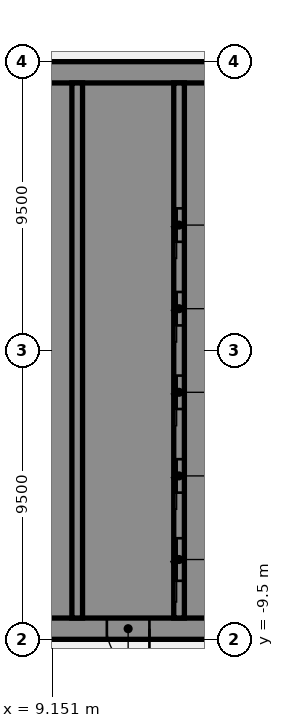
"""IFC4 building model, lengths in metres.
Left out: names, types, materials, properties, quantities, classifications, styles, units other than length and angle.
Written with IfcOpenShell. Run it as: python <this file> out.ifc"""

import sys

from ifc_helpers import new_model, si_unit, direction, frame, frame_2d, origin, place, context, subcontext, project, spatial, polyline, rectangle, outline, extrude, element, fill, save


model = new_model("IFC4")
c1 = context("Model", 3, precision=1e-05, world=origin(), true_north=direction((0.0, 1.0)))
c2 = subcontext(c1, "Body", "Model", "MODEL_VIEW")
j1 = project(units=[si_unit("LENGTHUNIT", "METRE"), si_unit("PLANEANGLEUNIT", "RADIAN")], contexts=[c1])
p1 = place(None, origin())
s1 = spatial("IfcSite", under=j1, at=p1, CompositionType="ELEMENT")
p2 = place(p1, origin())
s2 = spatial("IfcBuilding", under=s1, at=p2, CompositionType="ELEMENT")
p3 = place(p2, frame((0.0, 0.0, 9.0)))
s3 = spatial("IfcBuildingStorey", under=s2, at=p3, CompositionType="ELEMENT", Elevation=9.0)
p4 = place(p3, frame((16.5, -9.15, 0.0), z_axis=(0.0, 0.0, 1.0), x_axis=(-1.0, 0.0, 0.0)))
e1 = element("IfcWall", 1, at=p4, inside=s3, PredefinedType="SHEAR", context=c2, shape_type="SweptSolid", body=[
    extrude(rectangle(XDim=13.0, YDim=0.7, at=frame_2d((6.5, 0.0))), origin(), (0.0, 0.0, 1.0), 5.5),
])
p5 = place(p4, frame((4.15, 0.0, 0.0)))
e2 = element("IfcOpeningElement", 2, at=p5, cuts=e1, PredefinedType="OPENING", context=c2, shape_type="SweptSolid", body=[
    extrude(rectangle(XDim=1.4, YDim=2.1, at=frame_2d((0.7, 1.05))), frame((0.0, 0.36, 0.0), z_axis=(0.0, -1.0, 0.0), x_axis=(1.0, 0.0, 0.0)), (0.0, 0.0, 1.0), 0.72),
])
p6 = place(p4, frame((10.125, 0.0, 0.0)))
e3 = element("IfcOpeningElement", 3, at=p6, cuts=e1, PredefinedType="OPENING", context=c2, shape_type="SweptSolid", body=[
    extrude(rectangle(XDim=1.4, YDim=2.1, at=frame_2d((0.7, 1.05))), frame((0.0, 0.36, 0.0), z_axis=(0.0, -1.0, 0.0), x_axis=(1.0, 0.0, 0.0)), (0.0, 0.0, 1.0), 0.72),
])
p7 = place(p3, origin())
e4 = element("IfcWall", 4, at=p7, inside=s3, PredefinedType="SHEAR", context=c2, shape_type="SweptSolid", body=[
    extrude(outline(polyline([(13.5, -8.8), (15.8, -8.8), (16.5, -8.8), (16.5, 8.8), (15.8, 8.8), (13.5, 8.8), (13.5, 8.125), (15.8, 8.125), (15.8, 5.625), (13.5, 5.625), (13.5, 5.375), (15.8, 5.375), (15.8, 2.875), (13.5, 2.875), (13.5, 2.625), (15.8, 2.625), (15.8, 0.125), (13.5, 0.125), (13.5, -0.125), (15.8, -0.125), (15.8, -2.625), (13.5, -2.625), (13.5, -2.875), (15.8, -2.875), (15.8, -5.375), (13.5, -5.375), (13.5, -5.625), (15.8, -5.625), (15.8, -8.125), (13.5, -8.125), (13.5, -8.8)])), origin(), (0.0, 0.0, 1.0), 5.5),
])
p8 = place(p3, frame((16.5, 9.15, 0.0), z_axis=(0.0, 0.0, 1.0), x_axis=(-1.0, 0.0, 0.0)))
e5 = element("IfcWall", 5, at=p8, inside=s3, PredefinedType="SHEAR", context=c2, shape_type="SweptSolid", body=[
    extrude(rectangle(XDim=13.0, YDim=0.7, at=frame_2d((6.5, 0.0))), origin(), (0.0, 0.0, 1.0), 5.5),
])
p9 = place(p3, origin())
e6 = element("IfcWall", 6, at=p9, inside=s3, PredefinedType="SHEAR", context=c2, shape_type="SweptSolid", body=[
    extrude(outline(polyline([(9.8, -5.375), (7.5, -5.375), (7.5, -2.875), (9.8, -2.875), (9.8, -2.625), (7.5, -2.625), (7.5, -0.125), (9.8, -0.125), (9.8, 0.125), (7.5, 0.125), (7.5, 2.625), (9.8, 2.625), (9.8, 2.875), (7.5, 2.875), (7.5, 5.375), (9.8, 5.375), (9.8, 5.625), (7.5, 5.625), (7.5, 8.125), (9.8, 8.125), (9.8, 8.8), (7.5, 8.8), (7.15, 8.8), (7.15, -5.625), (7.5, -5.625), (9.8, -5.625), (9.8, -5.375)])), origin(), (0.0, 0.0, 1.0), 5.5),
])
p10 = place(p3, origin())
e7 = element("IfcWall", 7, at=p10, inside=s3, PredefinedType="SHEAR", context=c2, shape_type="SweptSolid", body=[
    extrude(outline(polyline([(7.5, -8.125), (7.5, -8.8), (9.8, -8.8), (9.8, -8.125), (9.8, -5.625), (9.55, -5.625), (9.55, -8.125), (7.5, -8.125)])), origin(), (0.0, 0.0, 1.0), 5.5),
])
p11 = place(p3, frame((13.325, -8.8, 0.0), z_axis=(0.0, 0.0, 1.0), x_axis=(0.0, 1.0, 0.0)))
e8 = element("IfcWall", 8, at=p11, inside=s3, PredefinedType="SHEAR", context=c2, shape_type="SweptSolid", body=[
    extrude(rectangle(XDim=17.6, YDim=0.35, at=frame_2d((8.8, 0.0))), origin(), (0.0, 0.0, 1.0), 5.5),
])
p12 = place(p11, frame((1.225, 0.0, 0.0)))
e9 = element("IfcOpeningElement", 9, at=p12, cuts=e8, PredefinedType="OPENING", context=c2, shape_type="SweptSolid", body=[
    extrude(rectangle(XDim=1.4, YDim=2.1, at=frame_2d((0.7, 1.05))), frame((0.0, 0.185, 0.0), z_axis=(0.0, -1.0, 0.0), x_axis=(1.0, 0.0, 0.0)), (0.0, 0.0, 1.0), 0.37),
])
p13 = place(p11, frame((4.125, 0.0, 0.0)))
e10 = element("IfcOpeningElement", 10, at=p13, cuts=e8, PredefinedType="OPENING", context=c2, shape_type="SweptSolid", body=[
    extrude(rectangle(XDim=1.1, YDim=2.1, at=frame_2d((0.55, 1.05))), frame((0.0, 0.185, 0.0), z_axis=(0.0, -1.0, 0.0), x_axis=(1.0, 0.0, 0.0)), (0.0, 0.0, 1.0), 0.37),
])
p14 = place(p11, frame((6.875, 0.0, 0.0)))
e11 = element("IfcOpeningElement", 11, at=p14, cuts=e8, PredefinedType="OPENING", context=c2, shape_type="SweptSolid", body=[
    extrude(rectangle(XDim=1.1, YDim=2.1, at=frame_2d((0.55, 1.05))), frame((0.0, 0.185, 0.0), z_axis=(0.0, -1.0, 0.0), x_axis=(1.0, 0.0, 0.0)), (0.0, 0.0, 1.0), 0.37),
])
p15 = place(p11, frame((9.625, 0.0, 0.0)))
e12 = element("IfcOpeningElement", 12, at=p15, cuts=e8, PredefinedType="OPENING", context=c2, shape_type="SweptSolid", body=[
    extrude(rectangle(XDim=1.1, YDim=2.1, at=frame_2d((0.55, 1.05))), frame((0.0, 0.185, 0.0), z_axis=(0.0, -1.0, 0.0), x_axis=(1.0, 0.0, 0.0)), (0.0, 0.0, 1.0), 0.37),
])
p16 = place(p11, frame((12.375, 0.0, 0.0)))
e13 = element("IfcOpeningElement", 13, at=p16, cuts=e8, PredefinedType="OPENING", context=c2, shape_type="SweptSolid", body=[
    extrude(rectangle(XDim=1.1, YDim=2.1, at=frame_2d((0.55, 1.05))), frame((0.0, 0.185, 0.0), z_axis=(0.0, -1.0, 0.0), x_axis=(1.0, 0.0, 0.0)), (0.0, 0.0, 1.0), 0.37),
])
p17 = place(p3, frame((9.975, -8.8, 0.0), z_axis=(0.0, 0.0, 1.0), x_axis=(0.0, 1.0, 0.0)))
e14 = element("IfcWall", 14, at=p17, inside=s3, PredefinedType="SHEAR", context=c2, shape_type="SweptSolid", body=[
    extrude(rectangle(XDim=17.6, YDim=0.35, at=frame_2d((8.8, 0.0))), origin(), (0.0, 0.0, 1.0), 5.5),
])
p18 = place(p5, origin())
e15 = element("IfcDoor", 15, at=p18, inside=s3, OperationType="SINGLE_SWING_LEFT", PredefinedType="DOOR", context=c2, shape_type="SweptSolid", body=[
    extrude(rectangle(XDim=1.4, YDim=2.1, at=frame_2d((0.7, 1.05))), frame((0.0, 0.025, 0.0), z_axis=(0.0, -1.0, 0.0), x_axis=(1.0, 0.0, 0.0)), (0.0, 0.0, 1.0), 0.05),
])
fill(e2, e15)
p19 = place(p12, origin())
e16 = element("IfcDoor", 16, at=p19, inside=s3, OperationType="SLIDING_TO_LEFT", PredefinedType="DOOR", context=c2, shape_type="SweptSolid", body=[
    extrude(rectangle(XDim=1.4, YDim=2.1, at=frame_2d((0.7, 1.05))), frame((0.0, 0.025, 0.0), z_axis=(0.0, -1.0, 0.0), x_axis=(1.0, 0.0, 0.0)), (0.0, 0.0, 1.0), 0.05),
])
fill(e9, e16)
p20 = place(p13, origin())
e17 = element("IfcDoor", 17, at=p20, inside=s3, OperationType="SLIDING_TO_LEFT", PredefinedType="DOOR", context=c2, shape_type="SweptSolid", body=[
    extrude(rectangle(XDim=1.1, YDim=2.1, at=frame_2d((0.55, 1.05))), frame((0.0, 0.025, 0.0), z_axis=(0.0, -1.0, 0.0), x_axis=(1.0, 0.0, 0.0)), (0.0, 0.0, 1.0), 0.05),
])
fill(e10, e17)
p21 = place(p14, origin())
e18 = element("IfcDoor", 18, at=p21, inside=s3, OperationType="SLIDING_TO_LEFT", PredefinedType="DOOR", context=c2, shape_type="SweptSolid", body=[
    extrude(rectangle(XDim=1.1, YDim=2.1, at=frame_2d((0.55, 1.05))), frame((0.0, 0.025, 0.0), z_axis=(0.0, -1.0, 0.0), x_axis=(1.0, 0.0, 0.0)), (0.0, 0.0, 1.0), 0.05),
])
fill(e11, e18)
p22 = place(p15, origin())
e19 = element("IfcDoor", 19, at=p22, inside=s3, OperationType="SLIDING_TO_LEFT", PredefinedType="DOOR", context=c2, shape_type="SweptSolid", body=[
    extrude(rectangle(XDim=1.1, YDim=2.1, at=frame_2d((0.55, 1.05))), frame((0.0, 0.025, 0.0), z_axis=(0.0, -1.0, 0.0), x_axis=(1.0, 0.0, 0.0)), (0.0, 0.0, 1.0), 0.05),
])
fill(e12, e19)
p23 = place(p16, origin())
e20 = element("IfcDoor", 20, at=p23, inside=s3, OperationType="SLIDING_TO_LEFT", PredefinedType="DOOR", context=c2, shape_type="SweptSolid", body=[
    extrude(rectangle(XDim=1.1, YDim=2.1, at=frame_2d((0.55, 1.05))), frame((0.0, 0.025, 0.0), z_axis=(0.0, -1.0, 0.0), x_axis=(1.0, 0.0, 0.0)), (0.0, 0.0, 1.0), 0.05),
])
fill(e13, e20)
save(model, sys.argv[1])
